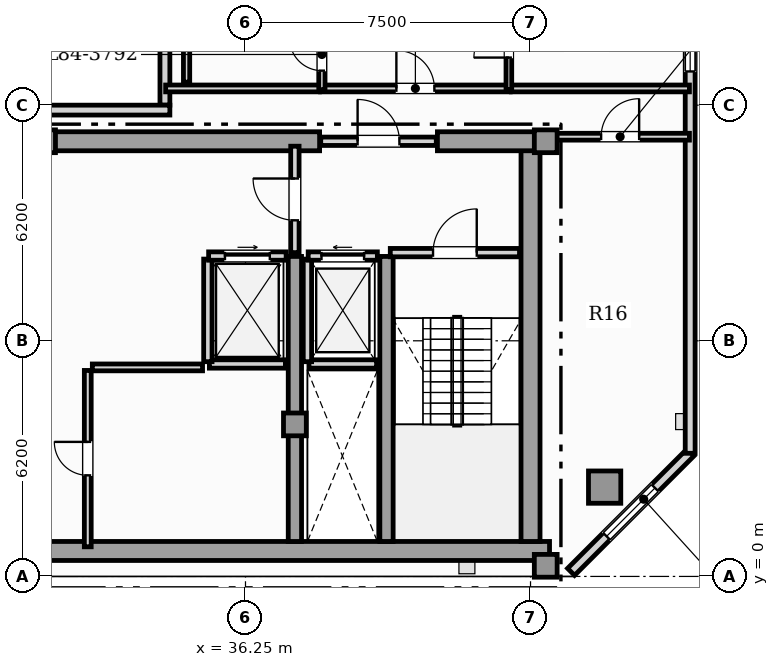
"""IFC4 building model, lengths in metres.
Left out: names, types, materials, properties, quantities, classifications, styles, units other than length and angle.
Written with IfcOpenShell. Run it as: python <this file> out.ifc"""

import sys

from ifc_helpers import new_model, si_unit, direction, frame, frame_2d, origin, origin_2d, place, context, subcontext, project, spatial, rectangle, hollow_rectangle, extrude, element, fill, save


model = new_model("IFC4")
c1 = context("Model", 3, precision=1e-05, world=origin(), true_north=direction((0.0, 1.0)))
c2 = subcontext(c1, "Body", "Model", "MODEL_VIEW")
j1 = project(units=[si_unit("LENGTHUNIT", "METRE"), si_unit("PLANEANGLEUNIT", "RADIAN")], contexts=[c1])
p1 = place(None, origin())
s1 = spatial("IfcSite", under=j1, at=p1, CompositionType="ELEMENT")
p2 = place(p1, origin())
s2 = spatial("IfcBuilding", under=s1, at=p2, CompositionType="ELEMENT")
p3 = place(p2, frame((0.0, 0.0, 341.35)))
s3 = spatial("IfcBuildingStorey", under=s2, at=p3, CompositionType="ELEMENT", Elevation=341.35)
p4 = place(p3, frame((13.25, 0.67, 0.0), z_axis=(0.0, 0.0, 1.0), x_axis=(1.0, 0.0, 0.0)))
e1 = element("IfcWall", 1, at=p4, inside=s3, PredefinedType="SHEAR", context=c2, shape_type="SweptSolid", body=[
    extrude(rectangle(XDim=31.0, YDim=0.5, at=frame_2d((15.5, 0.0))), origin(), (0.0, 0.0, 1.0), 3.63),
])
p5 = place(p3, frame((43.75, 0.92, 0.0), z_axis=(0.0, 0.0, 1.0), x_axis=(0.0, 1.0, 0.0)))
e2 = element("IfcWall", 2, at=p5, inside=s3, PredefinedType="SHEAR", context=c2, shape_type="SweptSolid", body=[
    extrude(rectangle(XDim=10.53, YDim=0.5, at=frame_2d((5.265, 0.0))), origin(), (0.0, 0.0, 1.0), 3.63),
])
p6 = place(p3, frame((30.9, 11.45, 0.0), z_axis=(0.0, 0.0, 1.0), x_axis=(1.0, 0.0, 0.0)))
e3 = element("IfcWall", 3, at=p6, inside=s3, PredefinedType="SHEAR", context=c2, shape_type="SweptSolid", body=[
    extrude(rectangle(XDim=7.3, YDim=0.5, at=frame_2d((3.65, 0.0))), origin(), (0.0, 0.0, 1.0), 3.63),
])
p7 = place(p3, frame((41.3, 11.45, 0.0), z_axis=(0.0, 0.0, 1.0), x_axis=(1.0, 0.0, 0.0)))
e4 = element("IfcWall", 4, at=p7, inside=s3, PredefinedType="SHEAR", context=c2, shape_type="SweptSolid", body=[
    extrude(rectangle(XDim=2.95, YDim=0.5, at=frame_2d((1.475, 0.0))), origin(), (0.0, 0.0, 1.0), 3.63),
])
for number, where, z_axis, x_axis in (
    (5, (37.55, 0.92, 0.0), (0.0, 0.0, 1.0), (0.0, 1.0, 0.0)),
    (6, (39.96, 0.92, 0.0), (0.0, 0.0, 1.0), (0.0, 1.0, 0.0)),
):
    element("IfcWall", number, at=place(p3, frame(where, z_axis=z_axis, x_axis=x_axis)), inside=s3, PredefinedType="SHEAR", context=c2, shape_type="SweptSolid", body=[
        extrude(rectangle(XDim=7.5, YDim=0.35, at=frame_2d((3.75, 0.0))), origin(), (0.0, 0.0, 1.0), 3.63),
    ])
for number, where, z_axis, x_axis in (
    (7, (44.15, 0.28, 0.0), (0.0, 0.0, 1.0), (1.0, 0.0, 0.0)),
    (8, (44.15, 11.45, 0.0), (0.0, 0.0, 1.0), (1.0, 0.0, 0.0)),
    (9, (37.55, 4.0, 0.0), (0.0, 0.0, 1.0), (1.0, 0.0, 0.0)),
    (10, (30.95, 11.45, 0.0), (0.0, 0.0, 1.0), (1.0, 0.0, 0.0)),
):
    element("IfcColumn", number, at=place(p3, frame(where, z_axis=z_axis, x_axis=x_axis)), inside=s3, PredefinedType="COLUMN", context=c2, shape_type="SweptSolid", body=[
        extrude(rectangle(XDim=0.6, YDim=0.6, at=origin_2d()), origin(), (0.0, 0.0, 1.0), 3.85),
    ])
p8 = place(p3, frame((45.7, 2.35, 0.0), z_axis=(0.0, 0.0, 1.0), x_axis=(1.0, 0.0, 0.0)))
e11 = element("IfcColumn", 11, at=p8, inside=s3, PredefinedType="USERDEFINED", context=c2, shape_type="SweptSolid", body=[
    extrude(hollow_rectangle(XDim=0.85, YDim=0.85, WallThickness=0.05, at=origin_2d()), origin(), (0.0, 0.0, 1.0), 3.85),
])
p9 = place(p3, frame((44.817, 0.12, 0.0), z_axis=(0.0, 0.0, 1.0), x_axis=(0.707079321262, 0.707134240044, 0.0)))
e12 = element("IfcWall", 12, at=p9, inside=s3, PredefinedType="SOLIDWALL", context=c2, shape_type="SweptSolid", body=[
    extrude(rectangle(XDim=4.446, YDim=0.26, at=frame_2d((2.223, 0.0))), origin(), (0.0, 0.0, 1.0), 3.63),
])
p10 = place(p9, frame((1.323, 0.0, 0.85)))
e13 = element("IfcOpeningElement", 13, at=p10, cuts=e12, PredefinedType="OPENING", context=c2, shape_type="SweptSolid", body=[
    extrude(rectangle(XDim=1.8, YDim=2.0, at=frame_2d((0.9, 1.0))), frame((0.0, 0.14, 0.0), z_axis=(0.0, -1.0, 0.0), x_axis=(1.0, 0.0, 0.0)), (0.0, 0.0, 1.0), 0.28),
])
p11 = place(p3, frame((47.95, 3.24, 0.0), z_axis=(0.0, 0.0, 1.0), x_axis=(0.0, 1.0, 0.0)))
e14 = element("IfcWall", 14, at=p11, inside=s3, PredefinedType="SOLIDWALL", context=c2, shape_type="SweptSolid", body=[
    extrude(rectangle(XDim=25.168, YDim=0.26, at=frame_2d((12.584, 0.0))), origin(), (0.0, 0.0, 1.0), 3.63),
])
p12 = place(p11, frame((21.498, 0.0, 0.95)))
e15 = element("IfcOpeningElement", 15, at=p12, cuts=e14, PredefinedType="OPENING", context=c2, shape_type="SweptSolid", body=[
    extrude(rectangle(XDim=0.9, YDim=1.5, at=frame_2d((0.45, 0.75))), frame((0.0, 0.14, 0.0), z_axis=(0.0, -1.0, 0.0), x_axis=(1.0, 0.0, 0.0)), (0.0, 0.0, 1.0), 0.28),
])
p13 = place(p11, frame((10.047, 0.0, 0.88)))
e16 = element("IfcOpeningElement", 16, at=p13, cuts=e14, PredefinedType="OPENING", context=c2, shape_type="SweptSolid", body=[
    extrude(rectangle(XDim=1.65, YDim=2.0, at=frame_2d((0.825, 1.0))), frame((0.0, 0.14, 0.0), z_axis=(0.0, -1.0, 0.0), x_axis=(1.0, 0.0, 0.0)), (0.0, 0.0, 1.0), 0.28),
])
p14 = place(p11, frame((13.231, 0.0, 0.88)))
e17 = element("IfcOpeningElement", 17, at=p14, cuts=e14, PredefinedType="OPENING", context=c2, shape_type="SweptSolid", body=[
    extrude(rectangle(XDim=1.65, YDim=2.0, at=frame_2d((0.825, 1.0))), frame((0.0, 0.14, 0.0), z_axis=(0.0, -1.0, 0.0), x_axis=(1.0, 0.0, 0.0)), (0.0, 0.0, 1.0), 0.28),
])
p15 = place(p11, frame((17.773, 0.0, 0.88)))
e18 = element("IfcOpeningElement", 18, at=p15, cuts=e14, PredefinedType="OPENING", context=c2, shape_type="SweptSolid", body=[
    extrude(rectangle(XDim=1.65, YDim=2.0, at=frame_2d((0.825, 1.0))), frame((0.0, 0.14, 0.0), z_axis=(0.0, -1.0, 0.0), x_axis=(1.0, 0.0, 0.0)), (0.0, 0.0, 1.0), 0.28),
])
p16 = place(p11, frame((23.488, 0.0, 0.95)))
e19 = element("IfcOpeningElement", 19, at=p16, cuts=e14, PredefinedType="OPENING", context=c2, shape_type="SweptSolid", body=[
    extrude(rectangle(XDim=0.9, YDim=1.5, at=frame_2d((0.45, 0.75))), frame((0.0, 0.14, 0.0), z_axis=(0.0, -1.0, 0.0), x_axis=(1.0, 0.0, 0.0)), (0.0, 0.0, 1.0), 0.28),
])
p17 = place(p3, frame((34.13, 12.4, 0.0), z_axis=(0.0, 0.0, 1.0), x_axis=(0.0, 1.0, 0.0)))
e20 = element("IfcWall", 20, at=p17, inside=s3, PredefinedType="SOLIDWALL", context=c2, shape_type="SweptSolid", body=[
    extrude(rectangle(XDim=1.85, YDim=0.26, at=frame_2d((0.925, 0.0))), origin(), (0.0, 0.0, 1.0), 3.17),
])
p18 = place(p3, frame((34.26, 12.27, 0.0), z_axis=(0.0, 0.0, 1.0), x_axis=(-1.0, 0.0, 0.0)))
e21 = element("IfcWall", 21, at=p18, inside=s3, PredefinedType="SOLIDWALL", context=c2, shape_type="SweptSolid", body=[
    extrude(rectangle(XDim=11.02, YDim=0.26, at=frame_2d((5.51, 0.0))), origin(), (0.0, 0.0, 1.0), 3.63),
])
p19 = place(p3, frame((37.92, 5.59, 0.0), z_axis=(0.0, 0.0, 1.0), x_axis=(1.0, 0.0, 0.0)))
e22 = element("IfcWall", 22, at=p19, inside=s3, PredefinedType="SOLIDWALL", context=c2, shape_type="SweptSolid", body=[
    extrude(rectangle(XDim=1.78, YDim=0.22, at=frame_2d((0.89, 0.0))), origin(), (0.0, 0.0, 1.0), 3.63),
])
p20 = place(p3, frame((37.88, 5.65, 0.0), z_axis=(0.0, 0.0, 1.0), x_axis=(0.0, 1.0, 0.0)))
e23 = element("IfcWall", 23, at=p20, inside=s3, PredefinedType="SOLIDWALL", context=c2, shape_type="SweptSolid", body=[
    extrude(rectangle(XDim=2.7, YDim=0.22, at=frame_2d((1.35, 0.0))), origin(), (0.0, 0.0, 1.0), 3.63),
])
p21 = place(p3, frame((37.9, 8.43, 0.0), z_axis=(0.0, 0.0, 1.0), x_axis=(1.0, 0.0, 0.0)))
e24 = element("IfcWall", 24, at=p21, inside=s3, PredefinedType="SOLIDWALL", context=c2, shape_type="SweptSolid", body=[
    extrude(rectangle(XDim=1.82, YDim=0.22, at=frame_2d((0.91, 0.0))), origin(), (0.0, 0.0, 1.0), 3.63),
])
p22 = place(p21, frame((0.35, 0.0, 0.0)))
e25 = element("IfcOpeningElement", 25, at=p22, cuts=e24, PredefinedType="OPENING", context=c2, shape_type="SweptSolid", body=[
    extrude(rectangle(XDim=1.12, YDim=2.25, at=frame_2d((0.56, 1.125))), frame((0.0, 0.12, 0.0), z_axis=(0.0, -1.0, 0.0), x_axis=(1.0, 0.0, 0.0)), (0.0, 0.0, 1.0), 0.24),
])
p23 = place(p3, frame((35.3, 5.59, 0.0), z_axis=(0.0, 0.0, 1.0), x_axis=(1.0, 0.0, 0.0)))
e26 = element("IfcWall", 26, at=p23, inside=s3, PredefinedType="SOLIDWALL", context=c2, shape_type="SweptSolid", body=[
    extrude(rectangle(XDim=2.0, YDim=0.22, at=frame_2d((1.0, 0.0))), origin(), (0.0, 0.0, 1.0), 3.63),
])
p24 = place(p3, frame((35.26, 5.65, 0.0), z_axis=(0.0, 0.0, 1.0), x_axis=(0.0, 1.0, 0.0)))
e27 = element("IfcWall", 27, at=p24, inside=s3, PredefinedType="SOLIDWALL", context=c2, shape_type="SweptSolid", body=[
    extrude(rectangle(XDim=2.7, YDim=0.22, at=frame_2d((1.35, 0.0))), origin(), (0.0, 0.0, 1.0), 3.63),
])
p25 = place(p3, frame((35.28, 8.43, 0.0), z_axis=(0.0, 0.0, 1.0), x_axis=(1.0, 0.0, 0.0)))
e28 = element("IfcWall", 28, at=p25, inside=s3, PredefinedType="SOLIDWALL", context=c2, shape_type="SweptSolid", body=[
    extrude(rectangle(XDim=2.04, YDim=0.22, at=frame_2d((1.02, 0.0))), origin(), (0.0, 0.0, 1.0), 3.63),
])
p26 = place(p25, frame((0.43, 0.0, 0.0)))
e29 = element("IfcOpeningElement", 29, at=p26, cuts=e28, PredefinedType="OPENING", context=c2, shape_type="SweptSolid", body=[
    extrude(rectangle(XDim=1.18, YDim=2.2, at=frame_2d((0.59, 1.1))), frame((0.0, 0.12, 0.0), z_axis=(0.0, -1.0, 0.0), x_axis=(1.0, 0.0, 0.0)), (0.0, 0.0, 1.0), 0.24),
])
p27 = place(p3, frame((40.06, 8.52, 0.0), z_axis=(0.0, 0.0, 1.0), x_axis=(1.0, 0.0, 0.0)))
e30 = element("IfcWall", 30, at=p27, inside=s3, PredefinedType="SOLIDWALL", context=c2, shape_type="SweptSolid", body=[
    extrude(rectangle(XDim=3.4, YDim=0.22, at=frame_2d((1.7, 0.0))), origin(), (0.0, 0.0, 1.0), 3.63),
])
p28 = place(p27, frame((1.125, 0.0, 0.0)))
e31 = element("IfcOpeningElement", 31, at=p28, cuts=e30, PredefinedType="OPENING", context=c2, shape_type="SweptSolid", body=[
    extrude(rectangle(XDim=1.15, YDim=2.2, at=frame_2d((0.575, 1.1))), frame((0.0, 0.12, 0.0), z_axis=(0.0, -1.0, 0.0), x_axis=(1.0, 0.0, 0.0)), (0.0, 0.0, 1.0), 0.24),
])
p29 = place(p3, frame((37.55, 8.52, 0.0), z_axis=(0.0, 0.0, 1.0), x_axis=(0.0, 1.0, 0.0)))
e32 = element("IfcWall", 32, at=p29, inside=s3, PredefinedType="SOLIDWALL", context=c2, shape_type="SweptSolid", body=[
    extrude(rectangle(XDim=2.8, YDim=0.22, at=frame_2d((1.4, 0.0))), origin(), (0.0, 0.0, 1.0), 3.085),
])
p30 = place(p29, frame((0.85, 0.0, 0.0)))
e33 = element("IfcOpeningElement", 33, at=p30, cuts=e32, PredefinedType="OPENING", context=c2, shape_type="SweptSolid", body=[
    extrude(rectangle(XDim=1.1, YDim=2.2, at=frame_2d((0.55, 1.1))), frame((0.0, 0.12, 0.0), z_axis=(0.0, -1.0, 0.0), x_axis=(1.0, 0.0, 0.0)), (0.0, 0.0, 1.0), 0.24),
])
p31 = place(p3, frame((38.23, 11.45, 0.0), z_axis=(0.0, 0.0, 1.0), x_axis=(1.0, 0.0, 0.0)))
e34 = element("IfcWall", 34, at=p31, inside=s3, PredefinedType="SOLIDWALL", context=c2, shape_type="SweptSolid", body=[
    extrude(rectangle(XDim=3.04, YDim=0.22, at=frame_2d((1.52, 0.0))), origin(), (0.0, 0.0, 1.0), 3.63),
])
p32 = place(p31, frame((0.97, 0.0, 0.0)))
e35 = element("IfcOpeningElement", 35, at=p32, cuts=e34, PredefinedType="OPENING", context=c2, shape_type="SweptSolid", body=[
    extrude(rectangle(XDim=1.1, YDim=2.2, at=frame_2d((0.55, 1.1))), frame((0.0, 0.12, 0.0), z_axis=(0.0, -1.0, 0.0), x_axis=(1.0, 0.0, 0.0)), (0.0, 0.0, 1.0), 0.24),
])
p33 = place(p3, frame((32.1, 0.78, 0.0), z_axis=(0.0, 0.0, 1.0), x_axis=(0.0, 1.0, 0.0)))
e36 = element("IfcWall", 36, at=p33, inside=s3, PredefinedType="PARTITIONING", context=c2, shape_type="SweptSolid", body=[
    extrude(rectangle(XDim=4.64, YDim=0.18, at=frame_2d((2.32, 0.0))), origin(), (0.0, 0.0, 1.0), 3.63),
])
p34 = place(p33, frame((1.88, 0.0, 0.0)))
e37 = element("IfcOpeningElement", 37, at=p34, cuts=e36, PredefinedType="OPENING", context=c2, shape_type="SweptSolid", body=[
    extrude(rectangle(XDim=0.88, YDim=2.05, at=frame_2d((0.44, 1.025))), frame((0.0, 0.1, 0.0), z_axis=(0.0, -1.0, 0.0), x_axis=(1.0, 0.0, 0.0)), (0.0, 0.0, 1.0), 0.2),
])
p35 = place(p3, frame((32.22, 5.5, 0.0), z_axis=(0.0, 0.0, 1.0), x_axis=(1.0, 0.0, 0.0)))
e38 = element("IfcWall", 38, at=p35, inside=s3, PredefinedType="PARTITIONING", context=c2, shape_type="SweptSolid", body=[
    extrude(rectangle(XDim=2.9, YDim=0.18, at=frame_2d((1.45, 0.0))), origin(), (0.0, 0.0, 1.0), 3.63),
])
p36 = place(p3, frame((44.285, 11.57, 0.0), z_axis=(0.0, 0.0, 1.0), x_axis=(1.0, 0.0, 0.0)))
e39 = element("IfcWall", 39, at=p36, inside=s3, PredefinedType="PARTITIONING", context=c2, shape_type="SweptSolid", body=[
    extrude(rectangle(XDim=3.646, YDim=0.18, at=frame_2d((1.823, 0.0))), origin(), (0.0, 0.0, 1.0), 3.63),
])
p37 = place(p36, frame((1.323, 0.0, 0.0)))
e40 = element("IfcOpeningElement", 40, at=p37, cuts=e39, PredefinedType="OPENING", context=c2, shape_type="SweptSolid", body=[
    extrude(rectangle(XDim=1.0, YDim=2.15, at=frame_2d((0.5, 1.075))), frame((0.0, 0.1, 0.0), z_axis=(0.0, -1.0, 0.0), x_axis=(1.0, 0.0, 0.0)), (0.0, 0.0, 1.0), 0.2),
])
p38 = place(p3, frame((38.225, 12.84, 0.0), z_axis=(0.0, 0.0, 1.0), x_axis=(1.0, 0.0, 0.0)))
e41 = element("IfcWall", 41, at=p38, inside=s3, PredefinedType="PARTITIONING", context=c2, shape_type="SweptSolid", body=[
    extrude(rectangle(XDim=4.99, YDim=0.18, at=frame_2d((2.495, 0.0))), origin(), (0.0, 0.0, 1.0), 3.63),
])
p39 = place(p38, frame((1.995, 0.0, 0.0)))
e42 = element("IfcOpeningElement", 42, at=p39, cuts=e41, PredefinedType="OPENING", context=c2, shape_type="SweptSolid", body=[
    extrude(rectangle(XDim=1.0, YDim=2.15, at=frame_2d((0.5, 1.075))), frame((0.0, 0.1, 0.0), z_axis=(0.0, -1.0, 0.0), x_axis=(1.0, 0.0, 0.0)), (0.0, 0.0, 1.0), 0.2),
])
p40 = place(p3, frame((34.149, 12.84, 0.0), z_axis=(0.0, 0.0, 1.0), x_axis=(1.0, 0.0, 0.0)))
e43 = element("IfcWall", 43, at=p40, inside=s3, PredefinedType="PARTITIONING", context=c2, shape_type="SweptSolid", body=[
    extrude(rectangle(XDim=4.046, YDim=0.18, at=frame_2d((2.023, 0.0))), origin(), (0.0, 0.0, 1.0), 3.63),
])
p41 = place(p3, frame((43.245, 12.84, 0.0), z_axis=(0.0, 0.0, 1.0), x_axis=(1.0, 0.0, 0.0)))
e44 = element("IfcWall", 44, at=p41, inside=s3, PredefinedType="PARTITIONING", context=c2, shape_type="SweptSolid", body=[
    extrude(rectangle(XDim=4.686, YDim=0.18, at=frame_2d((2.343, 0.0))), origin(), (0.0, 0.0, 1.0), 3.63),
])
p42 = place(p3, frame((38.26, 12.805, 0.0), z_axis=(0.0, 0.0, 1.0), x_axis=(0.0, 1.0, 0.0)))
e45 = element("IfcWall", 45, at=p42, inside=s3, PredefinedType="PLUMBINGWALL", context=c2, shape_type="SweptSolid", body=[
    extrude(rectangle(XDim=1.857, YDim=0.165, at=frame_2d((0.928, 0.0))), origin(), (0.0, 0.0, 1.0), 3.63),
])
p43 = place(p42, frame((0.503, 0.0, 0.0)))
e46 = element("IfcOpeningElement", 46, at=p43, cuts=e45, PredefinedType="OPENING", context=c2, shape_type="SweptSolid", body=[
    extrude(rectangle(XDim=0.85, YDim=2.1, at=frame_2d((0.425, 1.05))), frame((0.0, 0.093, 0.0), z_axis=(0.0, -1.0, 0.0), x_axis=(1.0, 0.0, 0.0)), (0.0, 0.0, 1.0), 0.185),
])
p44 = place(p3, frame((43.18, 12.805, 0.0), z_axis=(0.0, 0.0, 1.0), x_axis=(0.0, 1.0, 0.0)))
e47 = element("IfcWall", 47, at=p44, inside=s3, PredefinedType="PARTITIONING", context=c2, shape_type="SweptSolid", body=[
    extrude(rectangle(XDim=2.614, YDim=0.15, at=frame_2d((1.307, 0.0))), origin(), (0.0, 0.0, 1.0), 3.63),
])
p45 = place(p44, frame((0.847, 0.0, 0.0)))
e48 = element("IfcOpeningElement", 48, at=p45, cuts=e47, PredefinedType="OPENING", context=c2, shape_type="SweptSolid", body=[
    extrude(rectangle(XDim=0.92, YDim=2.1, at=frame_2d((0.46, 1.05))), frame((0.0, 0.085, 0.0), z_axis=(0.0, -1.0, 0.0), x_axis=(1.0, 0.0, 0.0)), (0.0, 0.0, 1.0), 0.17),
])
p46 = place(p3, frame((34.7, 13.005, 0.0), z_axis=(0.0, 0.0, 1.0), x_axis=(0.0, 1.0, 0.0)))
e49 = element("IfcWall", 49, at=p46, inside=s3, PredefinedType="PLUMBINGWALL", context=c2, shape_type="SweptSolid", body=[
    extrude(rectangle(XDim=1.457, YDim=0.165, at=frame_2d((0.728, 0.0))), origin(), (0.0, 0.0, 1.0), 3.63),
])
p47 = place(p10, origin())
e50 = element("IfcWindow", 50, at=p47, inside=s3, PartitioningType="SINGLE_PANEL", PredefinedType="WINDOW", context=c2, shape_type="SweptSolid", body=[
    extrude(rectangle(XDim=1.8, YDim=2.0, at=frame_2d((0.9, 1.0))), frame((0.0, 0.03, 0.0), z_axis=(0.0, -1.0, 0.0), x_axis=(1.0, 0.0, 0.0)), (0.0, 0.0, 1.0), 0.06),
])
fill(e13, e50)
p48 = place(p13, origin())
e51 = element("IfcWindow", 51, at=p48, inside=s3, PartitioningType="SINGLE_PANEL", PredefinedType="WINDOW", context=c2, shape_type="SweptSolid", body=[
    extrude(rectangle(XDim=1.65, YDim=2.0, at=frame_2d((0.825, 1.0))), frame((0.0, 0.03, 0.0), z_axis=(0.0, -1.0, 0.0), x_axis=(1.0, 0.0, 0.0)), (0.0, 0.0, 1.0), 0.06),
])
fill(e16, e51)
p49 = place(p22, origin())
e52 = element("IfcDoor", 52, at=p49, inside=s3, OperationType="SLIDING_TO_LEFT", PredefinedType="DOOR", context=c2, shape_type="SweptSolid", body=[
    extrude(rectangle(XDim=1.12, YDim=2.25, at=frame_2d((0.56, 1.125))), frame((0.0, 0.025, 0.0), z_axis=(0.0, -1.0, 0.0), x_axis=(1.0, 0.0, 0.0)), (0.0, 0.0, 1.0), 0.05),
])
fill(e25, e52)
p50 = place(p26, origin())
e53 = element("IfcDoor", 53, at=p50, inside=s3, OperationType="SLIDING_TO_RIGHT", PredefinedType="DOOR", context=c2, shape_type="SweptSolid", body=[
    extrude(rectangle(XDim=1.18, YDim=2.2, at=frame_2d((0.59, 1.1))), frame((0.0, 0.025, 0.0), z_axis=(0.0, -1.0, 0.0), x_axis=(1.0, 0.0, 0.0)), (0.0, 0.0, 1.0), 0.05),
])
fill(e29, e53)
p51 = place(p28, origin())
e54 = element("IfcDoor", 54, at=p51, inside=s3, OperationType="SINGLE_SWING_RIGHT", PredefinedType="DOOR", context=c2, shape_type="SweptSolid", body=[
    extrude(rectangle(XDim=1.15, YDim=2.2, at=frame_2d((0.575, 1.1))), frame((0.0, 0.025, 0.0), z_axis=(0.0, -1.0, 0.0), x_axis=(1.0, 0.0, 0.0)), (0.0, 0.0, 1.0), 0.05),
])
fill(e31, e54)
p52 = place(p30, origin())
e55 = element("IfcDoor", 55, at=p52, inside=s3, OperationType="SINGLE_SWING_RIGHT", PredefinedType="DOOR", context=c2, shape_type="SweptSolid", body=[
    extrude(rectangle(XDim=1.1, YDim=2.2, at=frame_2d((0.55, 1.1))), frame((0.0, 0.025, 0.0), z_axis=(0.0, -1.0, 0.0), x_axis=(1.0, 0.0, 0.0)), (0.0, 0.0, 1.0), 0.05),
])
fill(e33, e55)
p53 = place(p32, origin())
e56 = element("IfcDoor", 56, at=p53, inside=s3, OperationType="SINGLE_SWING_LEFT", PredefinedType="DOOR", context=c2, shape_type="SweptSolid", body=[
    extrude(rectangle(XDim=1.1, YDim=2.2, at=frame_2d((0.55, 1.1))), frame((0.0, 0.025, 0.0), z_axis=(0.0, -1.0, 0.0), x_axis=(1.0, 0.0, 0.0)), (0.0, 0.0, 1.0), 0.05),
])
fill(e35, e56)
p54 = place(p34, origin())
e57 = element("IfcDoor", 57, at=p54, inside=s3, OperationType="SINGLE_SWING_RIGHT", PredefinedType="DOOR", context=c2, shape_type="SweptSolid", body=[
    extrude(rectangle(XDim=0.88, YDim=2.05, at=frame_2d((0.44, 1.025))), frame((0.0, 0.025, 0.0), z_axis=(0.0, -1.0, 0.0), x_axis=(1.0, 0.0, 0.0)), (0.0, 0.0, 1.0), 0.05),
])
fill(e37, e57)
p55 = place(p37, origin())
e58 = element("IfcDoor", 58, at=p55, inside=s3, OperationType="SINGLE_SWING_RIGHT", PredefinedType="DOOR", context=c2, shape_type="SweptSolid", body=[
    extrude(rectangle(XDim=1.0, YDim=2.15, at=frame_2d((0.5, 1.075))), frame((0.0, 0.025, 0.0), z_axis=(0.0, -1.0, 0.0), x_axis=(1.0, 0.0, 0.0)), (0.0, 0.0, 1.0), 0.05),
])
fill(e40, e58)
p56 = place(p39, origin())
e59 = element("IfcDoor", 59, at=p56, inside=s3, OperationType="SINGLE_SWING_LEFT", PredefinedType="DOOR", context=c2, shape_type="SweptSolid", body=[
    extrude(rectangle(XDim=1.0, YDim=2.15, at=frame_2d((0.5, 1.075))), frame((0.0, 0.025, 0.0), z_axis=(0.0, -1.0, 0.0), x_axis=(1.0, 0.0, 0.0)), (0.0, 0.0, 1.0), 0.05),
])
fill(e42, e59)
p57 = place(p43, origin())
e60 = element("IfcDoor", 60, at=p57, inside=s3, OperationType="SINGLE_SWING_RIGHT", PredefinedType="DOOR", context=c2, shape_type="SweptSolid", body=[
    extrude(rectangle(XDim=0.85, YDim=2.1, at=frame_2d((0.425, 1.05))), frame((0.0, 0.025, 0.0), z_axis=(0.0, -1.0, 0.0), x_axis=(1.0, 0.0, 0.0)), (0.0, 0.0, 1.0), 0.05),
])
fill(e46, e60)
p58 = place(p45, origin())
e61 = element("IfcDoor", 61, at=p58, inside=s3, OperationType="SINGLE_SWING_LEFT", PredefinedType="DOOR", context=c2, shape_type="SweptSolid", body=[
    extrude(rectangle(XDim=0.92, YDim=2.1, at=frame_2d((0.46, 1.05))), frame((0.0, 0.025, 0.0), z_axis=(0.0, -1.0, 0.0), x_axis=(1.0, 0.0, 0.0)), (0.0, 0.0, 1.0), 0.05),
])
fill(e48, e61)
save(model, sys.argv[1])
